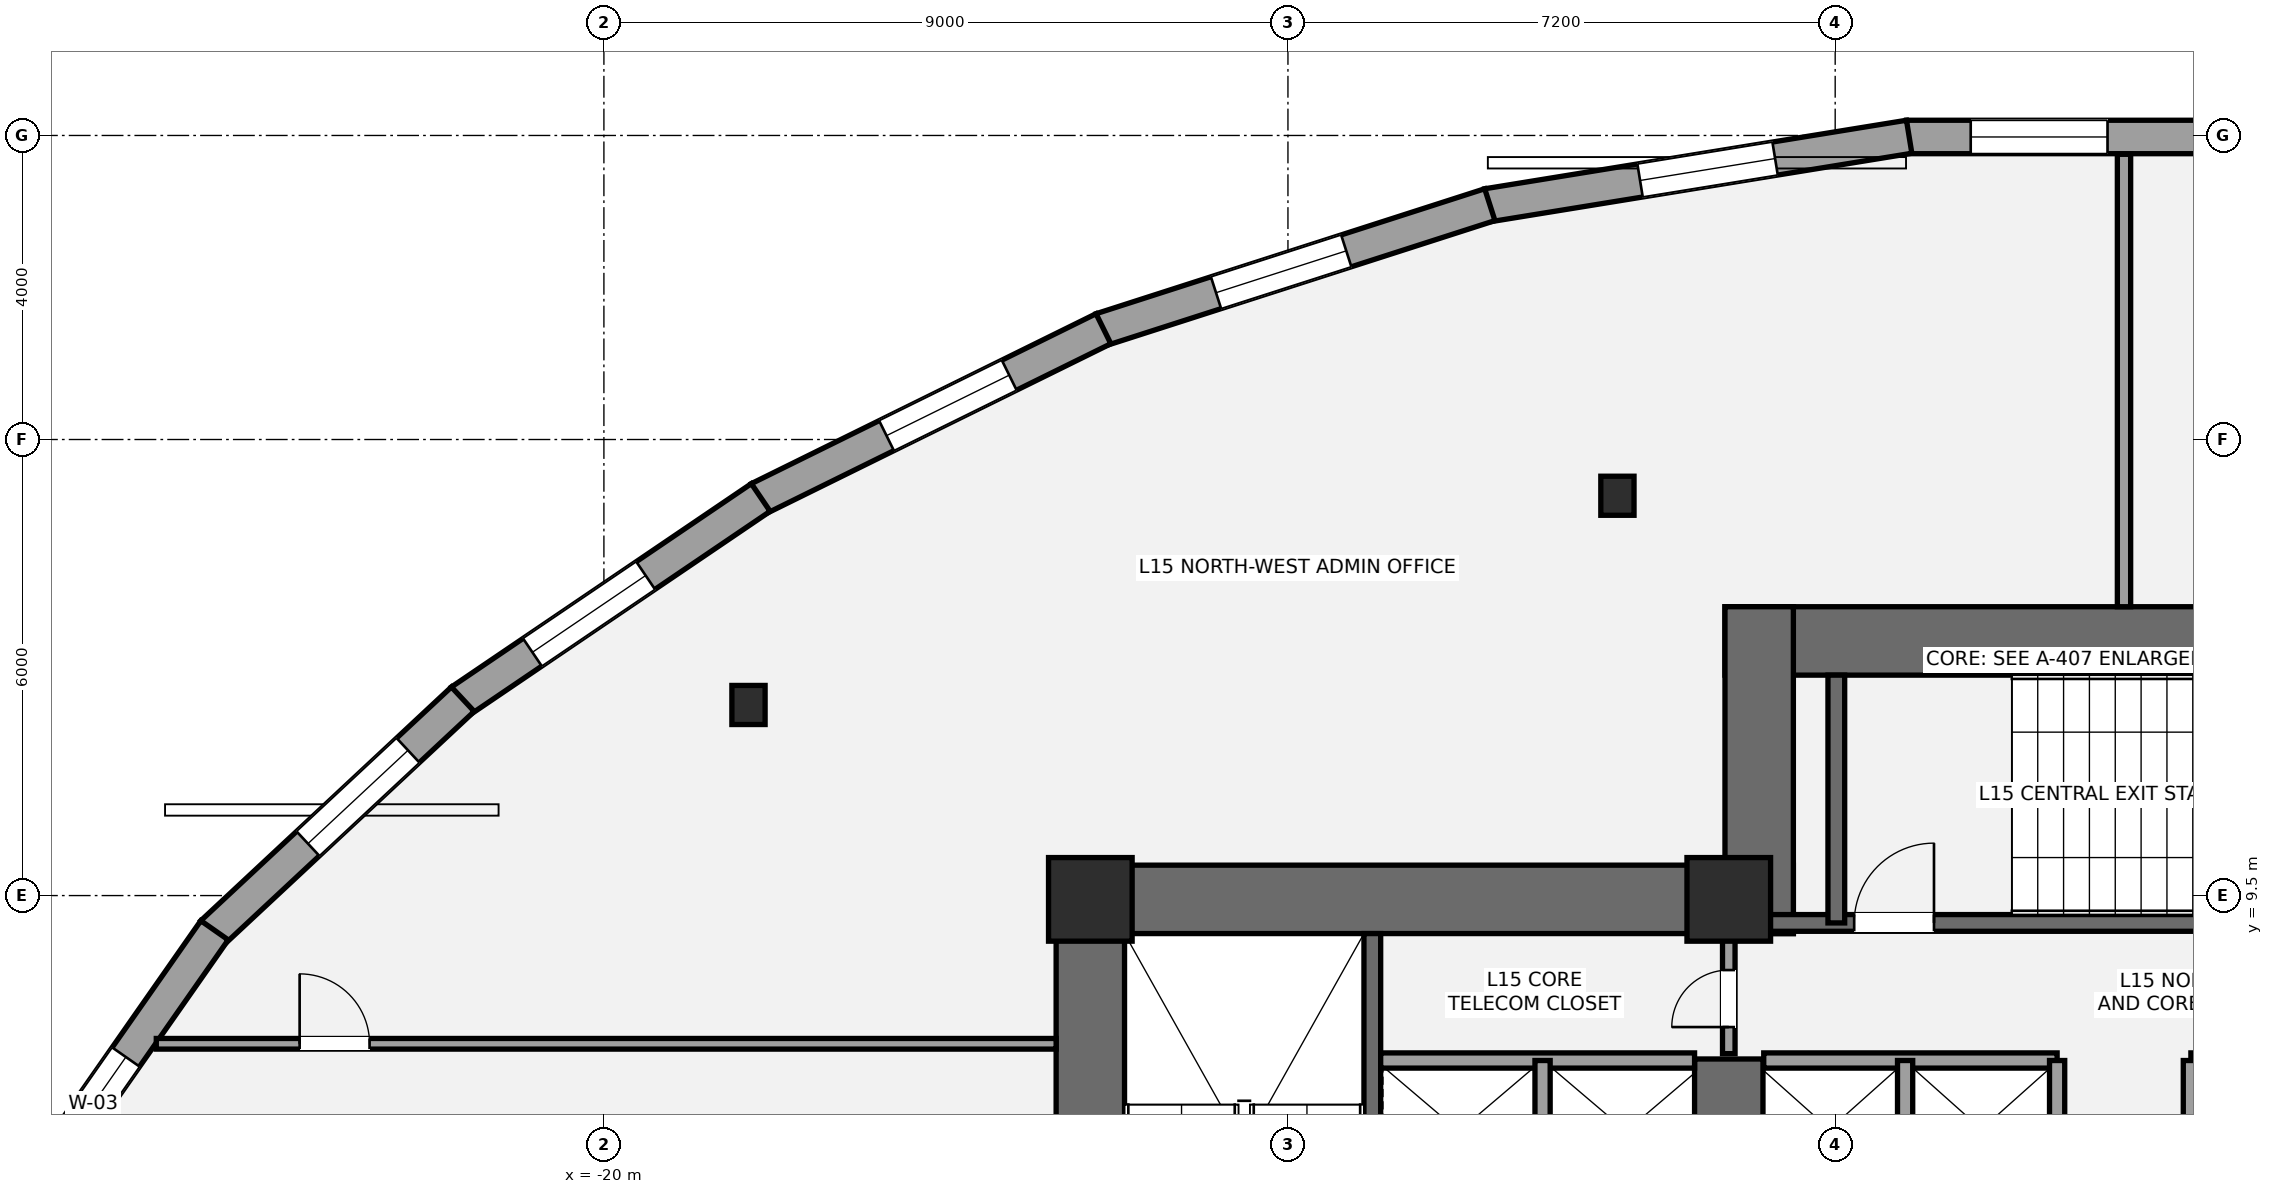
"""IFC4 building model, lengths in metres.
Left out: names, types, materials, properties, quantities, classifications, styles, units other than length and angle.
Written with IfcOpenShell. Run it as: python <this file> out.ifc"""

import sys

from ifc_helpers import new_model, si_unit, direction, frame, frame_2d, origin, origin_2d, place, context, subcontext, project, spatial, rectangle, i_section, extrude, element, fill, save


model = new_model("IFC4")
c1 = context("Model", 3, precision=1e-05, world=origin(), true_north=direction((0.0, 1.0)))
c2 = subcontext(c1, "Body", "Model", "MODEL_VIEW")
j1 = project(units=[si_unit("LENGTHUNIT", "METRE"), si_unit("PLANEANGLEUNIT", "RADIAN")], contexts=[c1])
p1 = place(None, origin())
s1 = spatial("IfcSite", under=j1, at=p1, CompositionType="ELEMENT")
p2 = place(p1, origin())
s2 = spatial("IfcBuilding", under=s1, at=p2, CompositionType="ELEMENT")
p3 = place(p2, frame((0.0, 0.0, 59.4)))
s3 = spatial("IfcBuildingStorey", under=s2, at=p3, CompositionType="ELEMENT", Elevation=59.4)
p4 = place(p3, frame((-13.6, 0.95, 0.0), z_axis=(0.0, 0.0, 1.0), x_axis=(0.0, 1.0, 0.0)))
e1 = element("IfcWall", 1, at=p4, inside=s3, PredefinedType="SHEAR", context=c2, shape_type="SweptSolid", body=[
    extrude(rectangle(XDim=8.95, YDim=0.9, at=frame_2d((4.475, 0.0))), origin(), (0.0, 0.0, 1.0), 3.6),
])
p5 = place(p3, frame((-14.05, 9.45, 0.0), z_axis=(0.0, 0.0, 1.0), x_axis=(1.0, 0.0, 0.0)))
e2 = element("IfcWall", 2, at=p5, inside=s3, PredefinedType="SHEAR", context=c2, shape_type="SweptSolid", body=[
    extrude(rectangle(XDim=9.7, YDim=0.9, at=frame_2d((4.85, 0.0))), origin(), (0.0, 0.0, 1.0), 3.6),
])
p6 = place(p3, frame((-5.2, 5.35, 0.0), z_axis=(0.0, 0.0, 1.0), x_axis=(0.0, 1.0, 0.0)))
e3 = element("IfcWall", 3, at=p6, inside=s3, PredefinedType="SHEAR", context=c2, shape_type="SweptSolid", body=[
    extrude(rectangle(XDim=2.0, YDim=0.9, at=frame_2d((1.0, 0.0))), origin(), (0.0, 0.0, 1.0), 3.6),
])
p7 = place(p3, frame((-9.89, 1.85, 0.0), z_axis=(0.0, 0.0, 1.0), x_axis=(0.0, 1.0, 0.0)))
e4 = element("IfcWall", 4, at=p7, inside=s3, PredefinedType="SHEAR", context=c2, shape_type="SweptSolid", body=[
    extrude(rectangle(XDim=7.15, YDim=0.22, at=frame_2d((3.575, 0.0))), origin(), (0.0, 0.0, 1.0), 3.6),
])
p8 = place(p3, frame((-5.25, 12.85, 0.0), z_axis=(0.0, 0.0, 1.0), x_axis=(1.0, 0.0, 0.0)))
e5 = element("IfcWall", 5, at=p8, inside=s3, PredefinedType="SHEAR", context=c2, shape_type="SweptSolid", body=[
    extrude(rectangle(XDim=10.5, YDim=0.9, at=frame_2d((5.25, 0.0))), origin(), (0.0, 0.0, 1.0), 3.6),
])
p9 = place(p3, frame((-4.8, 9.0, 0.0), z_axis=(0.0, 0.0, 1.0), x_axis=(0.0, 1.0, 0.0)))
e6 = element("IfcWall", 6, at=p9, inside=s3, PredefinedType="SHEAR", context=c2, shape_type="SweptSolid", body=[
    extrude(rectangle(XDim=4.3, YDim=0.9, at=frame_2d((2.15, 0.0))), origin(), (0.0, 0.0, 1.0), 3.6),
])
p10 = place(p3, frame((-4.7, 9.14, 0.0), z_axis=(0.0, 0.0, 1.0), x_axis=(1.0, 0.0, 0.0)))
e7 = element("IfcWall", 7, at=p10, inside=s3, PredefinedType="SHEAR", context=c2, shape_type="SweptSolid", body=[
    extrude(rectangle(XDim=9.3, YDim=0.22, at=frame_2d((4.65, 0.0))), origin(), (0.0, 0.0, 1.0), 3.6),
])
p11 = place(p10, frame((1.15, 0.0, 0.0)))
e8 = element("IfcOpeningElement", 8, at=p11, cuts=e7, PredefinedType="OPENING", context=c2, shape_type="SweptSolid", body=[
    extrude(rectangle(XDim=1.05, YDim=2.15, at=frame_2d((0.525, 1.075))), frame((0.0, 0.12, 0.0), z_axis=(0.0, -1.0, 0.0), x_axis=(1.0, 0.0, 0.0)), (0.0, 0.0, 1.0), 0.24),
])
p12 = place(p3, frame((-3.785, 9.14, 0.0), z_axis=(0.0, 0.0, 1.0), x_axis=(0.0, 1.0, 0.0)))
e9 = element("IfcWall", 9, at=p12, inside=s3, PredefinedType="SHEAR", context=c2, shape_type="SweptSolid", body=[
    extrude(rectangle(XDim=3.26, YDim=0.22, at=frame_2d((1.63, 0.0))), origin(), (0.0, 0.0, 1.0), 3.6),
])
for number, where, z_axis, x_axis in (
    (10, (-13.6, 9.45, 0.0), (0.0, 0.0, 1.0), (1.0, 0.0, 0.0)),
    (11, (-5.2, 9.45, 0.0), (0.0, 0.0, 1.0), (1.0, 0.0, 0.0)),
):
    element("IfcColumn", number, at=place(p3, frame(where, z_axis=z_axis, x_axis=x_axis)), inside=s3, PredefinedType="COLUMN", context=c2, shape_type="SweptSolid", body=[
        extrude(rectangle(XDim=1.1, YDim=1.1, at=origin_2d()), origin(), (0.0, 0.0, 1.0), 3.6),
    ])
for number, where, z_axis, x_axis in (
    (12, (-6.665, 14.76, 0.0), (0.0, 0.0, 1.0), (1.0, 0.0, 0.0)),
    (13, (-18.098, 12.007, 0.0), (0.0, 0.0, 1.0), (1.0, 0.0, 0.0)),
):
    element("IfcColumn", number, at=place(p3, frame(where, z_axis=z_axis, x_axis=x_axis)), inside=s3, PredefinedType="COLUMN", context=c2, shape_type="SweptSolid", body=[
        extrude(i_section(OverallWidth=0.437, OverallDepth=0.514, WebThickness=0.061, FlangeThickness=0.097, at=origin_2d()), origin(), (0.0, 0.0, 1.0), 3.6),
    ])
p13 = place(p3, frame((-2.862, 19.48, 0.0), z_axis=(0.0, 0.0, 1.0), x_axis=(1.0, 0.0, 0.0)))
e14 = element("IfcWall", 14, at=p13, inside=s3, PredefinedType="STANDARD", context=c2, shape_type="SweptSolid", body=[
    extrude(rectangle(XDim=5.724, YDim=0.44, at=frame_2d((2.862, 0.0))), origin(), (0.0, 0.0, 1.0), 2.533),
])
p14 = place(p13, frame((0.845, 0.0, 0.65)))
e15 = element("IfcOpeningElement", 15, at=p14, cuts=e14, PredefinedType="OPENING", context=c2, shape_type="SweptSolid", body=[
    extrude(rectangle(XDim=1.8, YDim=1.7, at=frame_2d((0.9, 0.85))), frame((0.0, 0.23, 0.0), z_axis=(0.0, -1.0, 0.0), x_axis=(1.0, 0.0, 0.0)), (0.0, 0.0, 1.0), 0.46),
])
p15 = place(p3, frame((-8.376, 18.581, 0.0), z_axis=(0.0, 0.0, 1.0), x_axis=(0.987057031186, 0.160369626756, 0.0)))
e16 = element("IfcWall", 16, at=p15, inside=s3, PredefinedType="STANDARD", context=c2, shape_type="SweptSolid", body=[
    extrude(rectangle(XDim=5.622, YDim=0.44, at=frame_2d((2.811, 0.0))), origin(), (0.0, 0.0, 1.0), 2.529),
])
p16 = place(p15, frame((2.035, 0.0, 0.65)))
e17 = element("IfcOpeningElement", 17, at=p16, cuts=e16, PredefinedType="OPENING", context=c2, shape_type="SweptSolid", body=[
    extrude(rectangle(XDim=1.8, YDim=1.7, at=frame_2d((0.9, 0.85))), frame((0.0, 0.23, 0.0), z_axis=(0.0, -1.0, 0.0), x_axis=(1.0, 0.0, 0.0)), (0.0, 0.0, 1.0), 0.46),
])
p17 = place(p3, frame((-13.458, 16.945, 0.0), z_axis=(0.0, 0.0, 1.0), x_axis=(0.95202383213, 0.30602389295, 0.0)))
e18 = element("IfcWall", 18, at=p17, inside=s3, PredefinedType="STANDARD", context=c2, shape_type="SweptSolid", body=[
    extrude(rectangle(XDim=5.372, YDim=0.44, at=frame_2d((2.686, 0.0))), origin(), (0.0, 0.0, 1.0), 2.529),
])
p18 = place(p17, frame((1.587, 0.0, 0.65)))
e19 = element("IfcOpeningElement", 19, at=p18, cuts=e18, PredefinedType="OPENING", context=c2, shape_type="SweptSolid", body=[
    extrude(rectangle(XDim=1.8, YDim=1.7, at=frame_2d((0.9, 0.85))), frame((0.0, 0.23, 0.0), z_axis=(0.0, -1.0, 0.0), x_axis=(1.0, 0.0, 0.0)), (0.0, 0.0, 1.0), 0.46),
])
p19 = place(p3, frame((-17.963, 14.722, 0.0), z_axis=(0.0, 0.0, 1.0), x_axis=(0.896962161347, 0.442107318545, 0.0)))
e20 = element("IfcWall", 20, at=p19, inside=s3, PredefinedType="STANDARD", context=c2, shape_type="SweptSolid", body=[
    extrude(rectangle(XDim=5.056, YDim=0.44, at=frame_2d((2.528, 0.0))), origin(), (0.0, 0.0, 1.0), 2.529),
])
p20 = place(p19, frame((1.874, 0.0, 0.65)))
e21 = element("IfcOpeningElement", 21, at=p20, cuts=e20, PredefinedType="OPENING", context=c2, shape_type="SweptSolid", body=[
    extrude(rectangle(XDim=1.8, YDim=1.7, at=frame_2d((0.9, 0.85))), frame((0.0, 0.23, 0.0), z_axis=(0.0, -1.0, 0.0), x_axis=(1.0, 0.0, 0.0)), (0.0, 0.0, 1.0), 0.46),
])
p21 = place(p3, frame((-21.883, 12.062, 0.0), z_axis=(0.0, 0.0, 1.0), x_axis=(0.827723816917, 0.561135708103, 0.0)))
e22 = element("IfcWall", 22, at=p21, inside=s3, PredefinedType="STANDARD", context=c2, shape_type="SweptSolid", body=[
    extrude(rectangle(XDim=4.768, YDim=0.44, at=frame_2d((2.384, 0.0))), origin(), (0.0, 0.0, 1.0), 2.529),
])
p22 = place(p21, frame((1.138, 0.0, 0.65)))
e23 = element("IfcOpeningElement", 23, at=p22, cuts=e22, PredefinedType="OPENING", context=c2, shape_type="SweptSolid", body=[
    extrude(rectangle(XDim=1.8, YDim=1.7, at=frame_2d((0.9, 0.85))), frame((0.0, 0.23, 0.0), z_axis=(0.0, -1.0, 0.0), x_axis=(1.0, 0.0, 0.0)), (0.0, 0.0, 1.0), 0.46),
])
p23 = place(p3, frame((-25.153, 9.009, 0.0), z_axis=(0.0, 0.0, 1.0), x_axis=(0.731343335822, 0.682009475849, 0.0)))
e24 = element("IfcWall", 24, at=p23, inside=s3, PredefinedType="STANDARD", context=c2, shape_type="SweptSolid", body=[
    extrude(rectangle(XDim=4.508, YDim=0.44, at=frame_2d((2.254, 0.0))), origin(), (0.0, 0.0, 1.0), 2.529),
])
p24 = place(p23, frame((1.722, 0.0, 0.65)))
e25 = element("IfcOpeningElement", 25, at=p24, cuts=e24, PredefinedType="OPENING", context=c2, shape_type="SweptSolid", body=[
    extrude(rectangle(XDim=1.8, YDim=1.7, at=frame_2d((0.9, 0.85))), frame((0.0, 0.23, 0.0), z_axis=(0.0, -1.0, 0.0), x_axis=(1.0, 0.0, 0.0)), (0.0, 0.0, 1.0), 0.46),
])
p25 = place(p3, frame((-27.548, 5.576, 0.0), z_axis=(0.0, 0.0, 1.0), x_axis=(0.573152463572, 0.819448749771, 0.0)))
e26 = element("IfcWall", 26, at=p25, inside=s3, PredefinedType="STANDARD", context=c2, shape_type="SweptSolid", body=[
    extrude(rectangle(XDim=4.231, YDim=0.44, at=frame_2d((2.115, 0.0))), origin(), (0.0, 0.0, 1.0), 2.529),
])
p26 = place(p25, frame((0.696, 0.0, 0.65)))
e27 = element("IfcOpeningElement", 27, at=p26, cuts=e26, PredefinedType="OPENING", context=c2, shape_type="SweptSolid", body=[
    extrude(rectangle(XDim=1.5, YDim=1.7, at=frame_2d((0.75, 0.85))), frame((0.0, 0.23, 0.0), z_axis=(0.0, -1.0, 0.0), x_axis=(1.0, 0.0, 0.0)), (0.0, 0.0, 1.0), 0.46),
])
p27 = place(p3, frame((-9.78, 7.33, 0.0), z_axis=(0.0, 0.0, 1.0), x_axis=(1.0, 0.0, 0.0)))
e28 = element("IfcWall", 28, at=p27, inside=s3, PredefinedType="SOLIDWALL", context=c2, shape_type="SweptSolid", body=[
    extrude(rectangle(XDim=4.13, YDim=0.2, at=frame_2d((2.065, 0.0))), origin(), (0.0, 0.0, 1.0), 3.4),
])
p28 = place(p3, frame((-7.65, 5.47, 0.0), z_axis=(0.0, 0.0, 1.0), x_axis=(0.0, 1.0, 0.0)))
e29 = element("IfcWall", 29, at=p28, inside=s3, PredefinedType="SOLIDWALL", context=c2, shape_type="SweptSolid", body=[
    extrude(rectangle(XDim=1.86, YDim=0.2, at=frame_2d((0.93, 0.0))), origin(), (0.0, 0.0, 1.0), 3.4),
])
for number, where, z_axis, x_axis in (
    (30, (-4.74, 7.33, 0.0), (0.0, 0.0, 1.0), (1.0, 0.0, 0.0)),
    (31, (0.88, 7.33, 0.0), (0.0, 0.0, 1.0), (1.0, 0.0, 0.0)),
):
    element("IfcWall", number, at=place(p3, frame(where, z_axis=z_axis, x_axis=x_axis)), inside=s3, PredefinedType="SOLIDWALL", context=c2, shape_type="SweptSolid", body=[
        extrude(rectangle(XDim=3.86, YDim=0.2, at=frame_2d((1.93, 0.0))), origin(), (0.0, 0.0, 1.0), 3.4),
    ])
for number, where, z_axis, x_axis in (
    (32, (-2.88, 5.52, 0.0), (0.0, 0.0, 1.0), (0.0, 1.0, 0.0)),
    (33, (-0.88, 5.52, 0.0), (0.0, 0.0, 1.0), (0.0, 1.0, 0.0)),
    (34, (0.88, 5.52, 0.0), (0.0, 0.0, 1.0), (0.0, 1.0, 0.0)),
):
    element("IfcWall", number, at=place(p3, frame(where, z_axis=z_axis, x_axis=x_axis)), inside=s3, PredefinedType="SOLIDWALL", context=c2, shape_type="SweptSolid", body=[
        extrude(rectangle(XDim=1.81, YDim=0.2, at=frame_2d((0.905, 0.0))), origin(), (0.0, 0.0, 1.0), 3.4),
    ])
p29 = place(p3, frame((-5.2, 7.42, 0.0), z_axis=(0.0, 0.0, 1.0), x_axis=(0.0, 1.0, 0.0)))
e35 = element("IfcWall", 35, at=p29, inside=s3, PredefinedType="PARTITIONING", context=c2, shape_type="SweptSolid", body=[
    extrude(rectangle(XDim=1.58, YDim=0.165, at=frame_2d((0.79, 0.0))), origin(), (0.0, 0.0, 1.0), 3.4),
])
p30 = place(p29, frame((0.35, 0.0, 0.0)))
e36 = element("IfcOpeningElement", 36, at=p30, cuts=e35, PredefinedType="OPENING", context=c2, shape_type="SweptSolid", body=[
    extrude(rectangle(XDim=0.75, YDim=2.1, at=frame_2d((0.375, 1.05))), frame((0.0, 0.093, 0.0), z_axis=(0.0, -1.0, 0.0), x_axis=(1.0, 0.0, 0.0)), (0.0, 0.0, 1.0), 0.185),
])
p31 = place(p3, frame((-25.889, 7.55, 0.0), z_axis=(0.0, 0.0, 1.0), x_axis=(1.0, 0.0, 0.0)))
e37 = element("IfcWall", 37, at=p31, inside=s3, PredefinedType="PARTITIONING", context=c2, shape_type="SweptSolid", body=[
    extrude(rectangle(XDim=11.839, YDim=0.14, at=frame_2d((5.92, 0.0))), origin(), (0.0, 0.0, 1.0), 2.853),
])
p32 = place(p31, frame((1.886, 0.0, 0.0)))
e38 = element("IfcOpeningElement", 38, at=p32, cuts=e37, PredefinedType="OPENING", context=c2, shape_type="SweptSolid", body=[
    extrude(rectangle(XDim=0.92, YDim=2.15, at=frame_2d((0.46, 1.075))), frame((0.0, 0.08, 0.0), z_axis=(0.0, -1.0, 0.0), x_axis=(1.0, 0.0, 0.0)), (0.0, 0.0, 1.0), 0.16),
])
p33 = place(p3, frame((0.0, 13.3, 0.0), z_axis=(0.0, 0.0, 1.0), x_axis=(0.0, 1.0, 0.0)))
e39 = element("IfcWall", 39, at=p33, inside=s3, PredefinedType="PARTITIONING", context=c2, shape_type="SweptSolid", body=[
    extrude(rectangle(XDim=5.952, YDim=0.175, at=frame_2d((2.976, 0.0))), origin(), (0.0, 0.0, 1.0), 3.4),
])
p34 = place(p14, origin())
e40 = element("IfcWindow", 40, at=p34, inside=s3, PartitioningType="SINGLE_PANEL", PredefinedType="WINDOW", context=c2, shape_type="SweptSolid", body=[
    extrude(rectangle(XDim=1.8, YDim=1.7, at=frame_2d((0.9, 0.85))), frame((0.0, -0.01, 0.0), z_axis=(0.0, -1.0, 0.0), x_axis=(1.0, 0.0, 0.0)), (0.0, 0.0, 1.0), 0.06),
])
fill(e15, e40)
p35 = place(p16, origin())
e41 = element("IfcWindow", 41, at=p35, inside=s3, PartitioningType="SINGLE_PANEL", PredefinedType="WINDOW", context=c2, shape_type="SweptSolid", body=[
    extrude(rectangle(XDim=1.8, YDim=1.7, at=frame_2d((0.9, 0.85))), frame((0.0, -0.01, 0.0), z_axis=(0.0, -1.0, 0.0), x_axis=(1.0, 0.0, 0.0)), (0.0, 0.0, 1.0), 0.06),
])
fill(e17, e41)
p36 = place(p18, origin())
e42 = element("IfcWindow", 42, at=p36, inside=s3, PartitioningType="SINGLE_PANEL", PredefinedType="WINDOW", context=c2, shape_type="SweptSolid", body=[
    extrude(rectangle(XDim=1.8, YDim=1.7, at=frame_2d((0.9, 0.85))), frame((0.0, -0.01, 0.0), z_axis=(0.0, -1.0, 0.0), x_axis=(1.0, 0.0, 0.0)), (0.0, 0.0, 1.0), 0.06),
])
fill(e19, e42)
p37 = place(p20, origin())
e43 = element("IfcWindow", 43, at=p37, inside=s3, PartitioningType="SINGLE_PANEL", PredefinedType="WINDOW", context=c2, shape_type="SweptSolid", body=[
    extrude(rectangle(XDim=1.8, YDim=1.7, at=frame_2d((0.9, 0.85))), frame((0.0, -0.01, 0.0), z_axis=(0.0, -1.0, 0.0), x_axis=(1.0, 0.0, 0.0)), (0.0, 0.0, 1.0), 0.06),
])
fill(e21, e43)
p38 = place(p22, origin())
e44 = element("IfcWindow", 44, at=p38, inside=s3, PartitioningType="SINGLE_PANEL", PredefinedType="WINDOW", context=c2, shape_type="SweptSolid", body=[
    extrude(rectangle(XDim=1.8, YDim=1.7, at=frame_2d((0.9, 0.85))), frame((0.0, -0.01, 0.0), z_axis=(0.0, -1.0, 0.0), x_axis=(1.0, 0.0, 0.0)), (0.0, 0.0, 1.0), 0.06),
])
fill(e23, e44)
p39 = place(p24, origin())
e45 = element("IfcWindow", 45, at=p39, inside=s3, PartitioningType="SINGLE_PANEL", PredefinedType="WINDOW", context=c2, shape_type="SweptSolid", body=[
    extrude(rectangle(XDim=1.8, YDim=1.7, at=frame_2d((0.9, 0.85))), frame((0.0, -0.01, 0.0), z_axis=(0.0, -1.0, 0.0), x_axis=(1.0, 0.0, 0.0)), (0.0, 0.0, 1.0), 0.06),
])
fill(e25, e45)
p40 = place(p26, origin())
e46 = element("IfcWindow", 46, at=p40, inside=s3, PartitioningType="SINGLE_PANEL", PredefinedType="WINDOW", context=c2, shape_type="SweptSolid", body=[
    extrude(rectangle(XDim=1.5, YDim=1.7, at=frame_2d((0.75, 0.85))), frame((0.0, -0.01, 0.0), z_axis=(0.0, -1.0, 0.0), x_axis=(1.0, 0.0, 0.0)), (0.0, 0.0, 1.0), 0.06),
])
fill(e27, e46)
p41 = place(p11, origin())
e47 = element("IfcDoor", 47, at=p41, inside=s3, OperationType="SINGLE_SWING_RIGHT", PredefinedType="DOOR", context=c2, shape_type="SweptSolid", body=[
    extrude(rectangle(XDim=1.05, YDim=2.15, at=frame_2d((0.525, 1.075))), frame((0.0, 0.025, 0.0), z_axis=(0.0, -1.0, 0.0), x_axis=(1.0, 0.0, 0.0)), (0.0, 0.0, 1.0), 0.05),
])
fill(e8, e47)
p42 = place(p30, origin())
e48 = element("IfcDoor", 48, at=p42, inside=s3, OperationType="SINGLE_SWING_LEFT", PredefinedType="DOOR", context=c2, shape_type="SweptSolid", body=[
    extrude(rectangle(XDim=0.75, YDim=2.1, at=frame_2d((0.375, 1.05))), frame((0.0, 0.025, 0.0), z_axis=(0.0, -1.0, 0.0), x_axis=(1.0, 0.0, 0.0)), (0.0, 0.0, 1.0), 0.05),
])
fill(e36, e48)
p43 = place(p32, origin())
e49 = element("IfcDoor", 49, at=p43, inside=s3, OperationType="SINGLE_SWING_LEFT", PredefinedType="DOOR", context=c2, shape_type="SweptSolid", body=[
    extrude(rectangle(XDim=0.92, YDim=2.15, at=frame_2d((0.46, 1.075))), frame((0.0, 0.025, 0.0), z_axis=(0.0, -1.0, 0.0), x_axis=(1.0, 0.0, 0.0)), (0.0, 0.0, 1.0), 0.05),
])
fill(e38, e49)
save(model, sys.argv[1])
